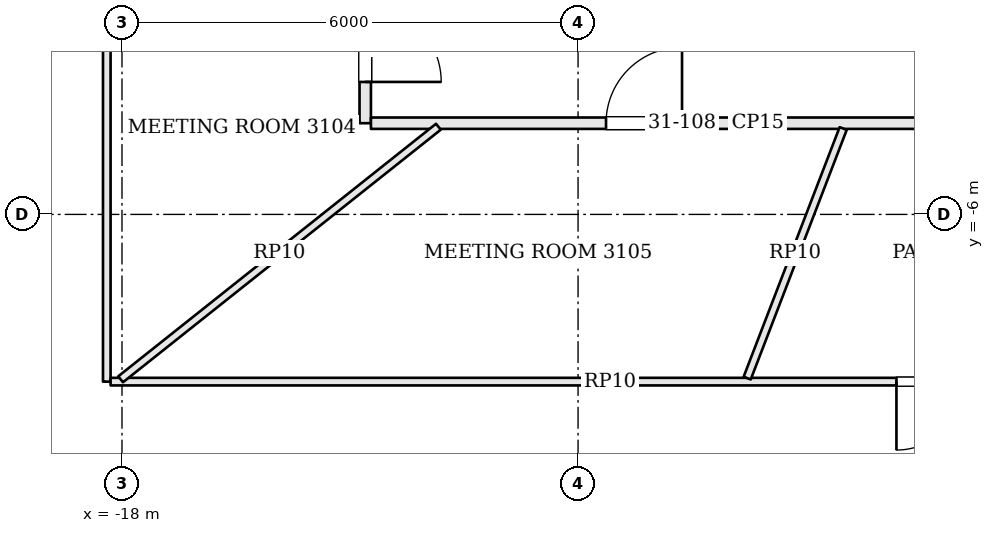
"""IFC4 building model, lengths in metres.
Left out: names, types, materials, properties, quantities, classifications, styles, units other than length and angle.
Written with IfcOpenShell. Run it as: python <this file> out.ifc"""

import sys

from ifc_helpers import new_model, si_unit, direction, frame, frame_2d, origin, place, context, subcontext, project, spatial, rectangle, extrude, element, fill, save


model = new_model("IFC4")
c1 = context("Model", 3, precision=1e-05, world=origin(), true_north=direction((0.0, 1.0)))
c2 = subcontext(c1, "Body", "Model", "MODEL_VIEW")
j1 = project(units=[si_unit("LENGTHUNIT", "METRE"), si_unit("PLANEANGLEUNIT", "RADIAN")], contexts=[c1])
p1 = place(None, origin())
s1 = spatial("IfcSite", under=j1, at=p1, CompositionType="ELEMENT")
p2 = place(p1, origin())
s2 = spatial("IfcBuilding", under=s1, at=p2, CompositionType="ELEMENT")
p3 = place(p2, frame((0.0, 0.0, 130.5)))
s3 = spatial("IfcBuildingStorey", under=s2, at=p3, CompositionType="ELEMENT", Elevation=130.5)
p4 = place(p3, frame((-14.8, 3.793, 0.0), z_axis=(0.0, 0.0, 1.0), x_axis=(0.0, -1.0, 0.0)))
e1 = element("IfcWall", 1, at=p4, inside=s3, PredefinedType="PARTITIONING", context=c2, shape_type="SweptSolid", body=[
    extrude(rectangle(XDim=8.593, YDim=0.15, at=frame_2d((4.296, 0.0))), origin(), (0.0, 0.0, 1.0), 3.198),
])
p5 = place(p4, frame((2.053, 0.0, 0.0)))
e2 = element("IfcOpeningElement", 2, at=p5, cuts=e1, PredefinedType="OPENING", context=c2, shape_type="SweptSolid", body=[
    extrude(rectangle(XDim=1.8, YDim=2.1, at=frame_2d((0.9, 1.05))), frame((0.0, 0.085, 0.0), z_axis=(0.0, -1.0, 0.0), x_axis=(1.0, 0.0, 0.0)), (0.0, 0.0, 1.0), 0.17),
])
p6 = place(p4, frame((7.05, 0.0, 0.0)))
e3 = element("IfcOpeningElement", 3, at=p6, cuts=e1, PredefinedType="OPENING", context=c2, shape_type="SweptSolid", body=[
    extrude(rectangle(XDim=1.0, YDim=2.4, at=frame_2d((0.5, 1.2))), frame((0.0, 0.085, 0.0), z_axis=(0.0, -1.0, 0.0), x_axis=(1.0, 0.0, 0.0)), (0.0, 0.0, 1.0), 0.17),
])
p7 = place(p3, frame((-14.725, -4.8, 0.0), z_axis=(0.0, 0.0, 1.0), x_axis=(1.0, 0.0, 0.0)))
e4 = element("IfcWall", 4, at=p7, inside=s3, PredefinedType="PARTITIONING", context=c2, shape_type="SweptSolid", body=[
    extrude(rectangle(XDim=10.185, YDim=0.15, at=frame_2d((5.092, 0.0))), origin(), (0.0, 0.0, 1.0), 3.198),
])
p8 = place(p7, frame((3.093, 0.0, 0.0)))
e5 = element("IfcOpeningElement", 5, at=p8, cuts=e4, PredefinedType="OPENING", context=c2, shape_type="SweptSolid", body=[
    extrude(rectangle(XDim=1.0, YDim=2.4, at=frame_2d((0.5, 1.2))), frame((0.0, 0.085, 0.0), z_axis=(0.0, -1.0, 0.0), x_axis=(1.0, 0.0, 0.0)), (0.0, 0.0, 1.0), 0.17),
])
p9 = place(p3, frame((-18.2, -8.2, 0.0), z_axis=(0.0, 0.0, 1.0), x_axis=(0.0, 1.0, 0.0)))
e6 = element("IfcWall", 6, at=p9, inside=s3, PredefinedType="PARTITIONING", context=c2, shape_type="SweptSolid", body=[
    extrude(rectangle(XDim=13.619, YDim=0.1, at=frame_2d((6.81, 0.0))), origin(), (0.0, 0.0, 1.0), 3.184),
])
p10 = place(p9, frame((9.383, 0.0, 0.0)))
e7 = element("IfcOpeningElement", 7, at=p10, cuts=e6, PredefinedType="OPENING", context=c2, shape_type="SweptSolid", body=[
    extrude(rectangle(XDim=1.0, YDim=2.1, at=frame_2d((0.5, 1.05))), frame((0.0, 0.06, 0.0), z_axis=(0.0, -1.0, 0.0), x_axis=(1.0, 0.0, 0.0)), (0.0, 0.0, 1.0), 0.12),
])
p11 = place(p3, frame((-5.005, -8.2, 0.0), z_axis=(0.0, 0.0, 1.0), x_axis=(-1.0, 0.0, 0.0)))
e8 = element("IfcWall", 8, at=p11, inside=s3, PredefinedType="PARTITIONING", context=c2, shape_type="SweptSolid", body=[
    extrude(rectangle(XDim=13.145, YDim=0.1, at=frame_2d((6.572, 0.0))), origin(), (0.0, 0.0, 1.0), 3.184),
])
p12 = place(p11, frame((1.906, 0.0, 0.0)))
e9 = element("IfcOpeningElement", 9, at=p12, cuts=e8, PredefinedType="OPENING", context=c2, shape_type="SweptSolid", body=[
    extrude(rectangle(XDim=0.9, YDim=2.1, at=frame_2d((0.45, 1.05))), frame((0.0, 0.06, 0.0), z_axis=(0.0, -1.0, 0.0), x_axis=(1.0, 0.0, 0.0)), (0.0, 0.0, 1.0), 0.12),
])
p13 = place(p3, frame((-13.838, -4.847, 0.0), z_axis=(0.0, 0.0, 1.0), x_axis=(-0.782880927661, -0.622171562437, 0.0)))
e10 = element("IfcWall", 10, at=p13, inside=s3, PredefinedType="PARTITIONING", context=c2, shape_type="SweptSolid", body=[
    extrude(rectangle(XDim=5.34, YDim=0.1, at=frame_2d((2.67, 0.0))), origin(), (0.0, 0.0, 1.0), 3.184),
])
p14 = place(p3, frame((-8.512, -4.87, 0.0), z_axis=(0.0, 0.0, 1.0), x_axis=(-0.359020935305, -0.933329506666, 0.0)))
e11 = element("IfcWall", 11, at=p14, inside=s3, PredefinedType="PARTITIONING", context=c2, shape_type="SweptSolid", body=[
    extrude(rectangle(XDim=3.518, YDim=0.1, at=frame_2d((1.759, 0.0))), origin(), (0.0, 0.0, 1.0), 3.184),
])
p15 = place(p6, origin())
e12 = element("IfcDoor", 12, at=p15, inside=s3, OperationType="SINGLE_SWING_RIGHT", PredefinedType="DOOR", context=c2, shape_type="SweptSolid", body=[
    extrude(rectangle(XDim=1.0, YDim=2.4, at=frame_2d((0.5, 1.2))), frame((0.0, 0.025, 0.0), z_axis=(0.0, -1.0, 0.0), x_axis=(1.0, 0.0, 0.0)), (0.0, 0.0, 1.0), 0.05),
])
fill(e3, e12)
p16 = place(p8, origin())
e13 = element("IfcDoor", 13, at=p16, inside=s3, OperationType="SINGLE_SWING_RIGHT", PredefinedType="DOOR", context=c2, shape_type="SweptSolid", body=[
    extrude(rectangle(XDim=1.0, YDim=2.4, at=frame_2d((0.5, 1.2))), frame((0.0, 0.025, 0.0), z_axis=(0.0, -1.0, 0.0), x_axis=(1.0, 0.0, 0.0)), (0.0, 0.0, 1.0), 0.05),
])
fill(e5, e13)
p17 = place(p12, origin())
e14 = element("IfcDoor", 14, at=p17, inside=s3, OperationType="SINGLE_SWING_RIGHT", PredefinedType="DOOR", context=c2, shape_type="SweptSolid", body=[
    extrude(rectangle(XDim=0.9, YDim=2.1, at=frame_2d((0.45, 1.05))), frame((0.0, 0.025, 0.0), z_axis=(0.0, -1.0, 0.0), x_axis=(1.0, 0.0, 0.0)), (0.0, 0.0, 1.0), 0.05),
])
fill(e9, e14)
save(model, sys.argv[1])
